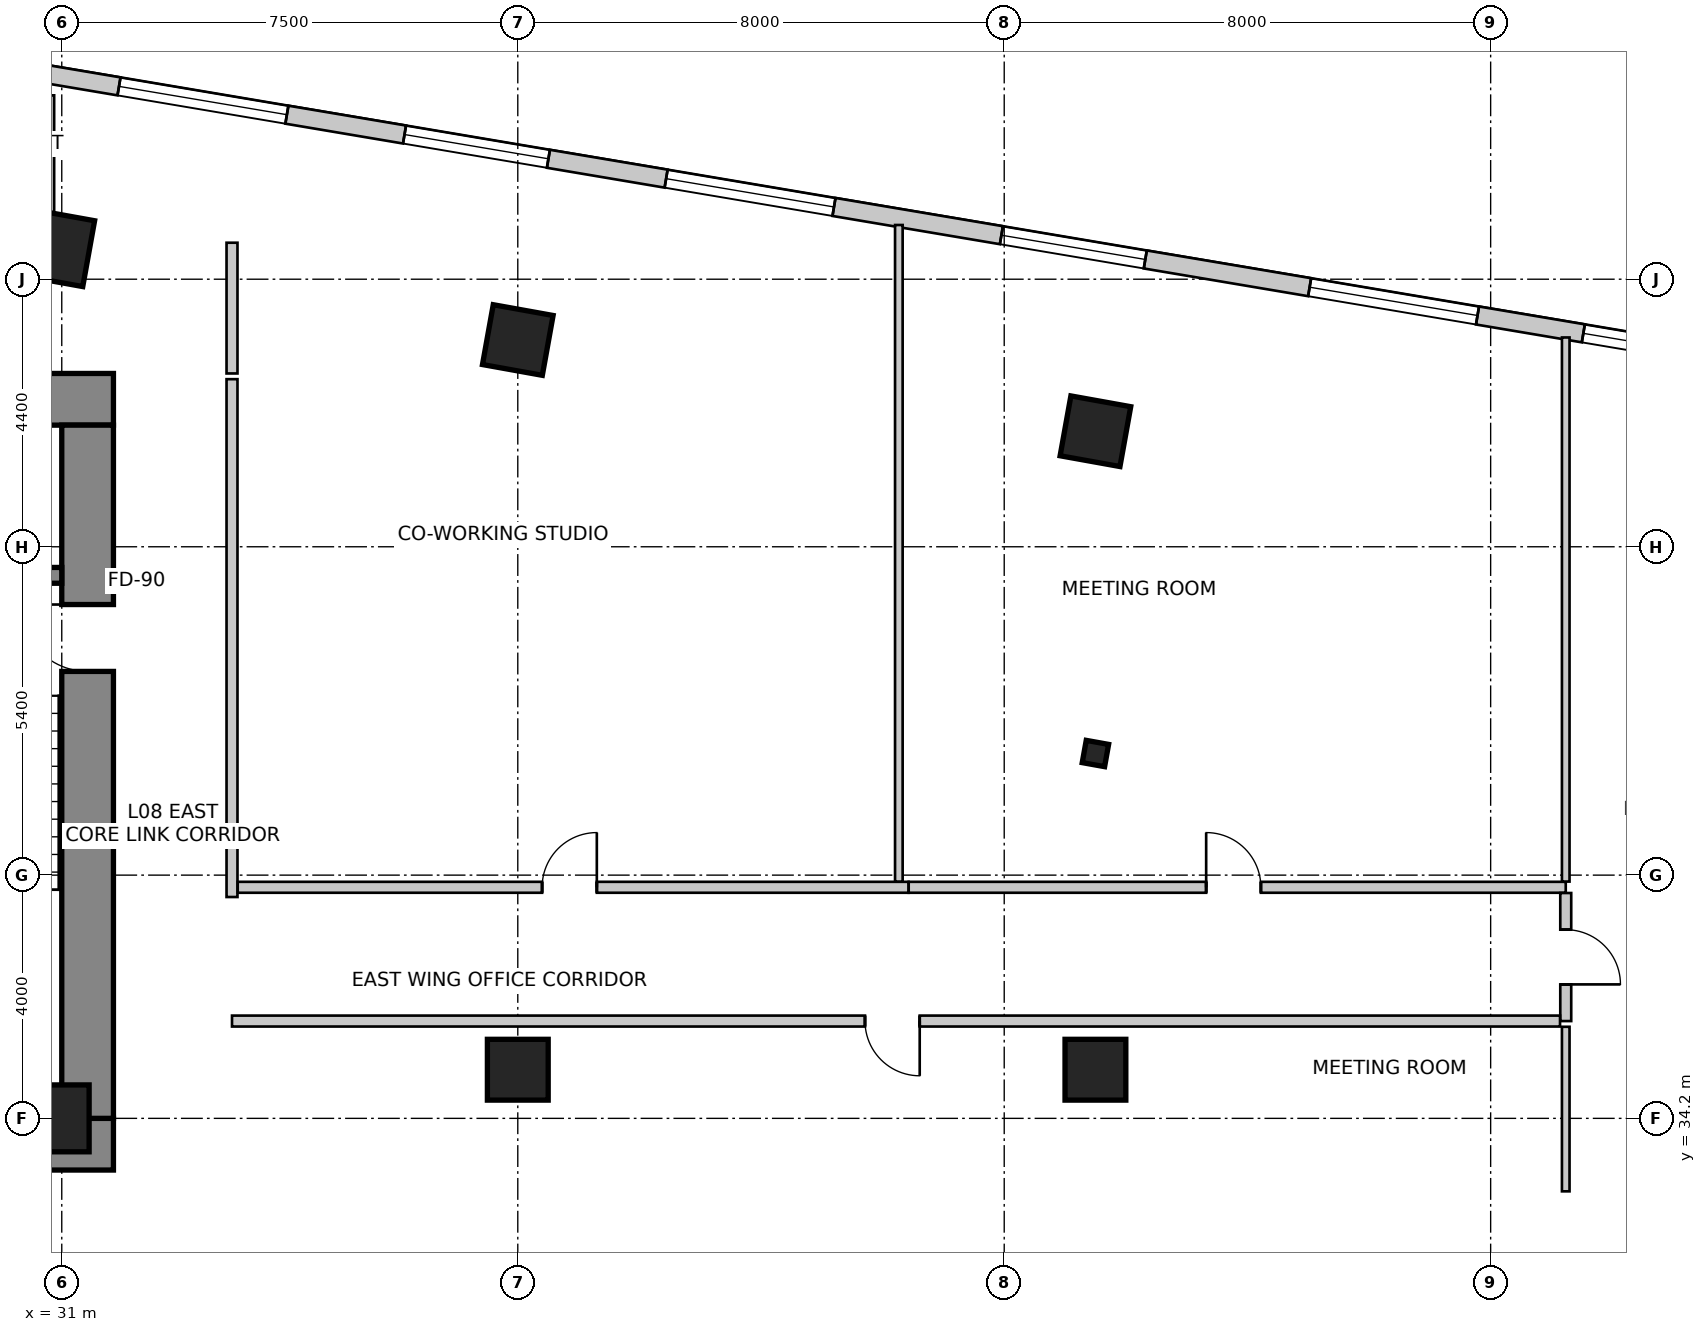
"""IFC4 building model, lengths in metres.
Left out: names, types, materials, properties, quantities, classifications, styles, units other than length and angle.
Written with IfcOpenShell. Run it as: python <this file> out.ifc"""

import sys

from ifc_helpers import new_model, si_unit, direction, frame, frame_2d, origin, origin_2d, place, context, subcontext, project, spatial, rectangle, i_section, extrude, source, transform, mapped, element, fill, save


model = new_model("IFC4")
c1 = context("Model", 3, precision=1e-05, world=origin(), true_north=direction((0.0, 1.0)))
c2 = subcontext(c1, "Body", "Model", "MODEL_VIEW")
j1 = project(units=[si_unit("LENGTHUNIT", "METRE"), si_unit("PLANEANGLEUNIT", "RADIAN")], contexts=[c1])
p1 = place(None, origin())
s1 = spatial("IfcSite", under=j1, at=p1, CompositionType="ELEMENT")
p2 = place(p1, origin())
s2 = spatial("IfcBuilding", under=s1, at=p2, CompositionType="ELEMENT")
p3 = place(p2, frame((0.0, 0.0, 35.0)))
s3 = spatial("IfcBuildingStorey", under=s2, at=p3, CompositionType="ELEMENT", Elevation=35.0)
p4 = place(p3, frame((15.75, 46.025, 0.0), z_axis=(0.0, 0.0, 1.0), x_axis=(1.0, 0.0, 0.0)))
e1 = element("IfcWall", 1, at=p4, inside=s3, PredefinedType="SHEAR", context=c2, shape_type="SweptSolid", body=[
    extrude(rectangle(XDim=16.1, YDim=0.85, at=frame_2d((8.05, 0.0))), origin(), (0.0, 0.0, 1.0), 4.0),
])
p5 = place(p3, frame((15.75, 33.775, 0.0), z_axis=(0.0, 0.0, 1.0), x_axis=(1.0, 0.0, 0.0)))
e2 = element("IfcWall", 2, at=p5, inside=s3, PredefinedType="SHEAR", context=c2, shape_type="SweptSolid", body=[
    extrude(rectangle(XDim=16.1, YDim=0.85, at=frame_2d((8.05, 0.0))), origin(), (0.0, 0.0, 1.0), 4.0),
])
m1 = source(origin(), c2, "Body", "SweptSolid", [
    extrude(rectangle(XDim=1.3, YDim=2.15, at=frame_2d((0.65, 1.075))), frame((0.0, 0.435, 0.0), z_axis=(0.0, -1.0, 0.0), x_axis=(1.0, 0.0, 0.0)), (0.0, 0.0, 1.0), 0.87),
])
p6 = place(p5, frame((10.18, 0.0, 0.0)))
e3 = element("IfcOpeningElement", 3, at=p6, cuts=e2, PredefinedType="OPENING", context=c2, shape_type="MappedRepresentation", body=[
    mapped(m1, transform((0.0, 0.0, 0.0), scale=1.0)),
])
p7 = place(p3, frame((31.425, 34.2, 0.0), z_axis=(0.0, 0.0, 1.0), x_axis=(0.0, 1.0, 0.0)))
e4 = element("IfcWall", 4, at=p7, inside=s3, PredefinedType="SHEAR", context=c2, shape_type="SweptSolid", body=[
    extrude(rectangle(XDim=11.4, YDim=0.85, at=frame_2d((5.7, 0.0))), origin(), (0.0, 0.0, 1.0), 4.0),
])
m2 = source(origin(), c2, "Body", "SweptSolid", [
    extrude(rectangle(XDim=1.1, YDim=2.15, at=frame_2d((0.55, 1.075))), frame((0.0, 0.435, 0.0), z_axis=(0.0, -1.0, 0.0), x_axis=(1.0, 0.0, 0.0)), (0.0, 0.0, 1.0), 0.87),
])
p8 = place(p7, frame((7.35, 0.0, 0.0)))
e5 = element("IfcOpeningElement", 5, at=p8, cuts=e4, PredefinedType="OPENING", context=c2, shape_type="MappedRepresentation", body=[
    mapped(m2, transform((0.0, 0.0, 0.0), scale=1.0)),
])
p9 = place(p3, frame((27.5, 43.13, 0.0), z_axis=(0.0, 0.0, 1.0), x_axis=(1.0, 0.0, 0.0)))
e6 = element("IfcWall", 6, at=p9, inside=s3, PredefinedType="SHEAR", context=c2, shape_type="SweptSolid", body=[
    extrude(rectangle(XDim=3.5, YDim=0.26, at=frame_2d((1.75, 0.0))), origin(), (0.0, 0.0, 1.0), 4.0),
])
m3 = source(origin(), c2, "Body", "SweptSolid", [
    extrude(rectangle(XDim=0.9, YDim=1.1, at=origin_2d()), origin(), (0.0, 0.0, 1.0), 4.0),
])
p10 = place(p3, frame((31.0, 48.5, 0.0), z_axis=(0.0, 0.0, 1.0), x_axis=(0.984195607969, -0.17708474032, 0.0)))
e7 = element("IfcColumn", 7, at=p10, inside=s3, PredefinedType="COLUMN", context=c2, shape_type="MappedRepresentation", body=[
    mapped(m3, transform((0.0, 0.0, 0.0), scale=1.0)),
])
m4 = source(origin(), c2, "Body", "SweptSolid", [
    extrude(rectangle(XDim=1.0, YDim=1.0, at=origin_2d()), origin(), (0.0, 0.0, 1.0), 4.0),
])
for number, where, z_axis, x_axis in (
    (8, (38.5, 47.0, 0.0), (0.0, 0.0, 1.0), (0.984, -0.177, 0.0)),
    (9, (48.0, 45.5, 0.0), (0.0, 0.0, 1.0), (0.984, -0.177, 0.0)),
):
    element("IfcColumn", number, at=place(p3, frame(where, z_axis=z_axis, x_axis=x_axis)), inside=s3, PredefinedType="COLUMN", context=c2, shape_type="MappedRepresentation", body=[
        mapped(m4, transform((0.0, 0.0, 0.0), scale=1.0)),
    ])
p11 = place(p3, frame((31.0, 34.2, 0.0), z_axis=(0.0, 0.0, 1.0), x_axis=(1.0, 0.0, 0.0)))
e10 = element("IfcColumn", 10, at=p11, inside=s3, PredefinedType="COLUMN", context=c2, shape_type="MappedRepresentation", body=[
    mapped(m3, transform((0.0, 0.0, 0.0), scale=1.0)),
])
for number, where, z_axis, x_axis in (
    (11, (38.5, 35.0, 0.0), (0.0, 0.0, 1.0), (1.0, 0.0, 0.0)),
    (12, (48.0, 35.0, 0.0), (0.0, 0.0, 1.0), (1.0, 0.0, 0.0)),
):
    element("IfcColumn", number, at=place(p3, frame(where, z_axis=z_axis, x_axis=x_axis)), inside=s3, PredefinedType="COLUMN", context=c2, shape_type="MappedRepresentation", body=[
        mapped(m4, transform((0.0, 0.0, 0.0), scale=1.0)),
    ])
m5 = source(origin(), c2, "Body", "SweptSolid", [
    extrude(i_section(OverallWidth=0.374, OverallDepth=0.372, WebThickness=0.016, FlangeThickness=0.026, FilletRadius=0.015, at=origin_2d()), origin(), (0.0, 0.0, 1.0), 4.0),
])
p12 = place(p3, frame((48.0, 40.2, 0.0), z_axis=(0.0, 0.0, 1.0), x_axis=(0.984195607969, -0.17708474032, 0.0)))
e13 = element("IfcColumn", 13, at=p12, inside=s3, PredefinedType="COLUMN", context=c2, shape_type="MappedRepresentation", body=[
    mapped(m5, transform((0.0, 0.0, 0.0), scale=1.0)),
])
p13 = place(p3, frame((58.761, 46.648, 0.0), z_axis=(0.0, 0.0, 1.0), x_axis=(-0.98607502735, 0.166301053624, 0.0)))
e14 = element("IfcWall", 14, at=p13, inside=s3, PredefinedType="SOLIDWALL", context=c2, shape_type="SweptSolid", body=[
    extrude(rectangle(XDim=37.397, YDim=0.3, at=frame_2d((18.699, 0.0))), origin(), (0.0, 0.0, 1.0), 3.75),
])
m6 = source(origin(), c2, "Body", "SweptSolid", [
    extrude(rectangle(XDim=2.4, YDim=2.2, at=frame_2d((1.2, 1.1))), frame((0.0, 0.16, 0.0), z_axis=(0.0, -1.0, 0.0), x_axis=(1.0, 0.0, 0.0)), (0.0, 0.0, 1.0), 0.32),
])
p14 = place(p13, frame((0.375, 0.0, 0.85)))
e15 = element("IfcOpeningElement", 15, at=p14, cuts=e14, PredefinedType="OPENING", context=c2, shape_type="MappedRepresentation", body=[
    mapped(m6, transform((0.0, 0.0, 0.0), scale=1.0)),
])
m7 = source(origin(), c2, "Body", "SweptSolid", [
    extrude(rectangle(XDim=2.8, YDim=2.4, at=frame_2d((1.4, 1.2))), frame((0.0, 0.16, 0.0), z_axis=(0.0, -1.0, 0.0), x_axis=(1.0, 0.0, 0.0)), (0.0, 0.0, 1.0), 0.32),
])
p15 = place(p13, frame((4.54, 0.0, 0.85)))
e16 = element("IfcOpeningElement", 16, at=p15, cuts=e14, PredefinedType="OPENING", context=c2, shape_type="MappedRepresentation", body=[
    mapped(m7, transform((0.0, 0.0, 0.0), scale=1.0)),
])
p16 = place(p13, frame((10.081, 0.0, 0.85)))
e17 = element("IfcOpeningElement", 17, at=p16, cuts=e14, PredefinedType="OPENING", context=c2, shape_type="MappedRepresentation", body=[
    mapped(m6, transform((0.0, 0.0, 0.0), scale=1.0)),
])
p17 = place(p13, frame((15.273, 0.0, 0.85)))
e18 = element("IfcOpeningElement", 18, at=p17, cuts=e14, PredefinedType="OPENING", context=c2, shape_type="MappedRepresentation", body=[
    mapped(m7, transform((0.0, 0.0, 0.0), scale=1.0)),
])
p18 = place(p13, frame((20.036, 0.0, 0.85)))
e19 = element("IfcOpeningElement", 19, at=p18, cuts=e14, PredefinedType="OPENING", context=c2, shape_type="MappedRepresentation", body=[
    mapped(m6, transform((0.0, 0.0, 0.0), scale=1.0)),
])
p19 = place(p13, frame((24.398, 0.0, 0.85)))
e20 = element("IfcOpeningElement", 20, at=p19, cuts=e14, PredefinedType="OPENING", context=c2, shape_type="MappedRepresentation", body=[
    mapped(m7, transform((0.0, 0.0, 0.0), scale=1.0)),
])
p20 = place(p13, frame((29.757, 0.0, 0.85)))
e21 = element("IfcOpeningElement", 21, at=p20, cuts=e14, PredefinedType="OPENING", context=c2, shape_type="MappedRepresentation", body=[
    mapped(m7, transform((0.0, 0.0, 0.0), scale=1.0)),
])
p21 = place(p13, frame((34.256, 0.0, 0.85)))
e22 = element("IfcOpeningElement", 22, at=p21, cuts=e14, PredefinedType="OPENING", context=c2, shape_type="MappedRepresentation", body=[
    mapped(m7, transform((0.0, 0.0, 0.0), scale=1.0)),
])
p22 = place(p3, frame((25.362, 48.6, 0.0), z_axis=(0.0, 0.0, 1.0), x_axis=(1.0, 0.0, 0.0)))
e23 = element("IfcWall", 23, at=p22, inside=s3, PredefinedType="PARTITIONING", context=c2, shape_type="SweptSolid", body=[
    extrude(rectangle(XDim=5.598, YDim=0.18, at=frame_2d((2.799, 0.0))), origin(), (0.0, 0.0, 1.0), 2.892),
])
m8 = source(origin(), c2, "Body", "SweptSolid", [
    extrude(rectangle(XDim=0.9, YDim=2.15, at=frame_2d((0.45, 1.075))), frame((0.0, 0.1, 0.0), z_axis=(0.0, -1.0, 0.0), x_axis=(1.0, 0.0, 0.0)), (0.0, 0.0, 1.0), 0.2),
])
p23 = place(p22, frame((2.349, 0.0, 0.0)))
e24 = element("IfcOpeningElement", 24, at=p23, cuts=e23, PredefinedType="OPENING", context=c2, shape_type="MappedRepresentation", body=[
    mapped(m8, transform((0.0, 0.0, 0.0), scale=1.0)),
])
p24 = place(p3, frame((33.8, 48.6, 0.0), z_axis=(0.0, 0.0, 1.0), x_axis=(0.0, -1.0, 0.0)))
e25 = element("IfcWall", 25, at=p24, inside=s3, PredefinedType="PARTITIONING", context=c2, shape_type="SweptSolid", body=[
    extrude(rectangle(XDim=2.15, YDim=0.18, at=frame_2d((1.075, 0.0))), origin(), (0.0, 0.0, 1.0), 2.892),
])
p25 = place(p3, frame((33.8, 46.356, 0.0), z_axis=(0.0, 0.0, 1.0), x_axis=(0.0, -1.0, 0.0)))
e26 = element("IfcWall", 26, at=p25, inside=s3, PredefinedType="PARTITIONING", context=c2, shape_type="SweptSolid", body=[
    extrude(rectangle(XDim=8.516, YDim=0.18, at=frame_2d((4.258, 0.0))), origin(), (0.0, 0.0, 1.0), 3.322),
])
p26 = place(p3, frame((33.894, 38.0, 0.0), z_axis=(0.0, 0.0, 1.0), x_axis=(1.0, 0.0, 0.0)))
e27 = element("IfcWall", 27, at=p26, inside=s3, PredefinedType="PARTITIONING", context=c2, shape_type="SweptSolid", body=[
    extrude(rectangle(XDim=11.033, YDim=0.18, at=frame_2d((5.517, 0.0))), origin(), (0.0, 0.0, 1.0), 3.125),
])
p27 = place(p26, frame((5.006, 0.0, 0.0)))
e28 = element("IfcOpeningElement", 28, at=p27, cuts=e27, PredefinedType="OPENING", context=c2, shape_type="MappedRepresentation", body=[
    mapped(m8, transform((0.0, 0.0, 0.0), scale=1.0)),
])
p28 = place(p3, frame((44.929, 38.0, 0.0), z_axis=(0.0, 0.0, 1.0), x_axis=(1.0, 0.0, 0.0)))
e29 = element("IfcWall", 29, at=p28, inside=s3, PredefinedType="PARTITIONING", context=c2, shape_type="SweptSolid", body=[
    extrude(rectangle(XDim=10.806, YDim=0.18, at=frame_2d((5.403, 0.0))), origin(), (0.0, 0.0, 1.0), 3.125),
])
p29 = place(p28, frame((4.892, 0.0, 0.0)))
e30 = element("IfcOpeningElement", 30, at=p29, cuts=e29, PredefinedType="OPENING", context=c2, shape_type="MappedRepresentation", body=[
    mapped(m8, transform((0.0, 0.0, 0.0), scale=1.0)),
])
p30 = place(p3, frame((55.735, 37.906, 0.0), z_axis=(0.0, 0.0, 1.0), x_axis=(0.0, -1.0, 0.0)))
e31 = element("IfcWall", 31, at=p30, inside=s3, PredefinedType="PARTITIONING", context=c2, shape_type="SweptSolid", body=[
    extrude(rectangle(XDim=2.106, YDim=0.18, at=frame_2d((1.053, 0.0))), origin(), (0.0, 0.0, 1.0), 3.75),
])
p31 = place(p30, frame((0.603, 0.0, 0.0)))
e32 = element("IfcOpeningElement", 32, at=p31, cuts=e31, PredefinedType="OPENING", context=c2, shape_type="MappedRepresentation", body=[
    mapped(m8, transform((0.0, 0.0, 0.0), scale=1.0)),
])
p32 = place(p3, frame((55.641, 35.8, 0.0), z_axis=(0.0, 0.0, 1.0), x_axis=(-1.0, 0.0, 0.0)))
e33 = element("IfcWall", 33, at=p32, inside=s3, PredefinedType="PARTITIONING", context=c2, shape_type="SweptSolid", body=[
    extrude(rectangle(XDim=21.841, YDim=0.18, at=frame_2d((10.92, 0.0))), origin(), (0.0, 0.0, 1.0), 3.125),
])
p33 = place(p32, frame((10.531, 0.0, 0.0)))
e34 = element("IfcOpeningElement", 34, at=p33, cuts=e33, PredefinedType="OPENING", context=c2, shape_type="MappedRepresentation", body=[
    mapped(m8, transform((0.0, 0.0, 0.0), scale=1.0)),
])
p34 = place(p3, frame((44.767, 48.892, 0.0), z_axis=(0.0, 0.0, 1.0), x_axis=(0.0, -1.0, 0.0)))
e35 = element("IfcWall", 35, at=p34, inside=s3, PredefinedType="PARTITIONING", context=c2, shape_type="SweptSolid", body=[
    extrude(rectangle(XDim=10.798, YDim=0.125, at=frame_2d((5.399, 0.0))), origin(), (0.0, 0.0, 1.0), 2.892),
])
p35 = place(p3, frame((55.735, 47.042, 0.0), z_axis=(0.0, 0.0, 1.0), x_axis=(0.0, -1.0, 0.0)))
e36 = element("IfcWall", 36, at=p35, inside=s3, PredefinedType="PARTITIONING", context=c2, shape_type="SweptSolid", body=[
    extrude(rectangle(XDim=8.948, YDim=0.125, at=frame_2d((4.474, 0.0))), origin(), (0.0, 0.0, 1.0), 3.75),
])
p36 = place(p3, frame((55.735, 33.0, 0.0), z_axis=(0.0, 0.0, 1.0), x_axis=(0.0, 1.0, 0.0)))
e37 = element("IfcWall", 37, at=p36, inside=s3, PredefinedType="PARTITIONING", context=c2, shape_type="SweptSolid", body=[
    extrude(rectangle(XDim=2.706, YDim=0.125, at=frame_2d((1.353, 0.0))), origin(), (0.0, 0.0, 1.0), 3.75),
])
p37 = place(p3, frame((30.8, 51.024, 0.0), z_axis=(0.0, 0.0, 1.0), x_axis=(0.0, -1.0, 0.0)))
e38 = element("IfcWall", 38, at=p37, inside=s3, PredefinedType="PARTITIONING", context=c2, shape_type="SweptSolid", body=[
    extrude(rectangle(XDim=2.204, YDim=0.15, at=frame_2d((1.102, 0.0))), origin(), (0.0, 0.0, 1.0), 3.75),
])
m9 = source(origin(), c2, "Body", "SweptSolid", [
    extrude(rectangle(XDim=2.4, YDim=2.2, at=frame_2d((1.2, 1.1))), frame((0.0, -0.015, 0.0), z_axis=(0.0, -1.0, 0.0), x_axis=(1.0, 0.0, 0.0)), (0.0, 0.0, 1.0), 0.06),
])
p38 = place(p14, origin())
e39 = element("IfcWindow", 39, at=p38, inside=s3, PartitioningType="SINGLE_PANEL", PredefinedType="WINDOW", context=c2, shape_type="MappedRepresentation", body=[
    mapped(m9, transform((0.0, 0.0, 0.0), scale=1.0)),
])
fill(e15, e39)
m10 = source(origin(), c2, "Body", "SweptSolid", [
    extrude(rectangle(XDim=2.8, YDim=2.4, at=frame_2d((1.4, 1.2))), frame((0.0, -0.015, 0.0), z_axis=(0.0, -1.0, 0.0), x_axis=(1.0, 0.0, 0.0)), (0.0, 0.0, 1.0), 0.06),
])
p39 = place(p15, origin())
e40 = element("IfcWindow", 40, at=p39, inside=s3, PartitioningType="SINGLE_PANEL", PredefinedType="WINDOW", context=c2, shape_type="MappedRepresentation", body=[
    mapped(m10, transform((0.0, 0.0, 0.0), scale=1.0)),
])
fill(e16, e40)
p40 = place(p16, origin())
e41 = element("IfcWindow", 41, at=p40, inside=s3, PartitioningType="SINGLE_PANEL", PredefinedType="WINDOW", context=c2, shape_type="MappedRepresentation", body=[
    mapped(m9, transform((0.0, 0.0, 0.0), scale=1.0)),
])
fill(e17, e41)
p41 = place(p17, origin())
e42 = element("IfcWindow", 42, at=p41, inside=s3, PartitioningType="SINGLE_PANEL", PredefinedType="WINDOW", context=c2, shape_type="MappedRepresentation", body=[
    mapped(m10, transform((0.0, 0.0, 0.0), scale=1.0)),
])
fill(e18, e42)
p42 = place(p18, origin())
e43 = element("IfcWindow", 43, at=p42, inside=s3, PartitioningType="SINGLE_PANEL", PredefinedType="WINDOW", context=c2, shape_type="MappedRepresentation", body=[
    mapped(m9, transform((0.0, 0.0, 0.0), scale=1.0)),
])
fill(e19, e43)
p43 = place(p19, origin())
e44 = element("IfcWindow", 44, at=p43, inside=s3, PartitioningType="SINGLE_PANEL", PredefinedType="WINDOW", context=c2, shape_type="MappedRepresentation", body=[
    mapped(m10, transform((0.0, 0.0, 0.0), scale=1.0)),
])
fill(e20, e44)
m11 = source(origin(), c2, "Body", "SweptSolid", [
    extrude(rectangle(XDim=1.1, YDim=2.15, at=frame_2d((0.55, 1.075))), frame((0.0, 0.025, 0.0), z_axis=(0.0, -1.0, 0.0), x_axis=(1.0, 0.0, 0.0)), (0.0, 0.0, 1.0), 0.05),
])
p44 = place(p8, origin())
e45 = element("IfcDoor", 45, at=p44, inside=s3, OperationType="SINGLE_SWING_RIGHT", PredefinedType="DOOR", context=c2, shape_type="MappedRepresentation", body=[
    mapped(m11, transform((0.0, 0.0, 0.0), scale=1.0)),
])
fill(e5, e45)
m12 = source(origin(), c2, "Body", "SweptSolid", [
    extrude(rectangle(XDim=0.9, YDim=2.15, at=frame_2d((0.45, 1.075))), frame((0.0, 0.025, 0.0), z_axis=(0.0, -1.0, 0.0), x_axis=(1.0, 0.0, 0.0)), (0.0, 0.0, 1.0), 0.05),
])
p45 = place(p27, origin())
e46 = element("IfcDoor", 46, at=p45, inside=s3, OperationType="SINGLE_SWING_RIGHT", PredefinedType="DOOR", context=c2, shape_type="MappedRepresentation", body=[
    mapped(m12, transform((0.0, 0.0, 0.0), scale=1.0)),
])
fill(e28, e46)
p46 = place(p29, origin())
e47 = element("IfcDoor", 47, at=p46, inside=s3, OperationType="SINGLE_SWING_LEFT", PredefinedType="DOOR", context=c2, shape_type="MappedRepresentation", body=[
    mapped(m12, transform((0.0, 0.0, 0.0), scale=1.0)),
])
fill(e30, e47)
p47 = place(p31, origin())
e48 = element("IfcDoor", 48, at=p47, inside=s3, OperationType="SINGLE_SWING_RIGHT", PredefinedType="DOOR", context=c2, shape_type="MappedRepresentation", body=[
    mapped(m12, transform((0.0, 0.0, 0.0), scale=1.0)),
])
fill(e32, e48)
p48 = place(p33, origin())
e49 = element("IfcDoor", 49, at=p48, inside=s3, OperationType="SINGLE_SWING_LEFT", PredefinedType="DOOR", context=c2, shape_type="MappedRepresentation", body=[
    mapped(m12, transform((0.0, 0.0, 0.0), scale=1.0)),
])
fill(e34, e49)
save(model, sys.argv[1])
